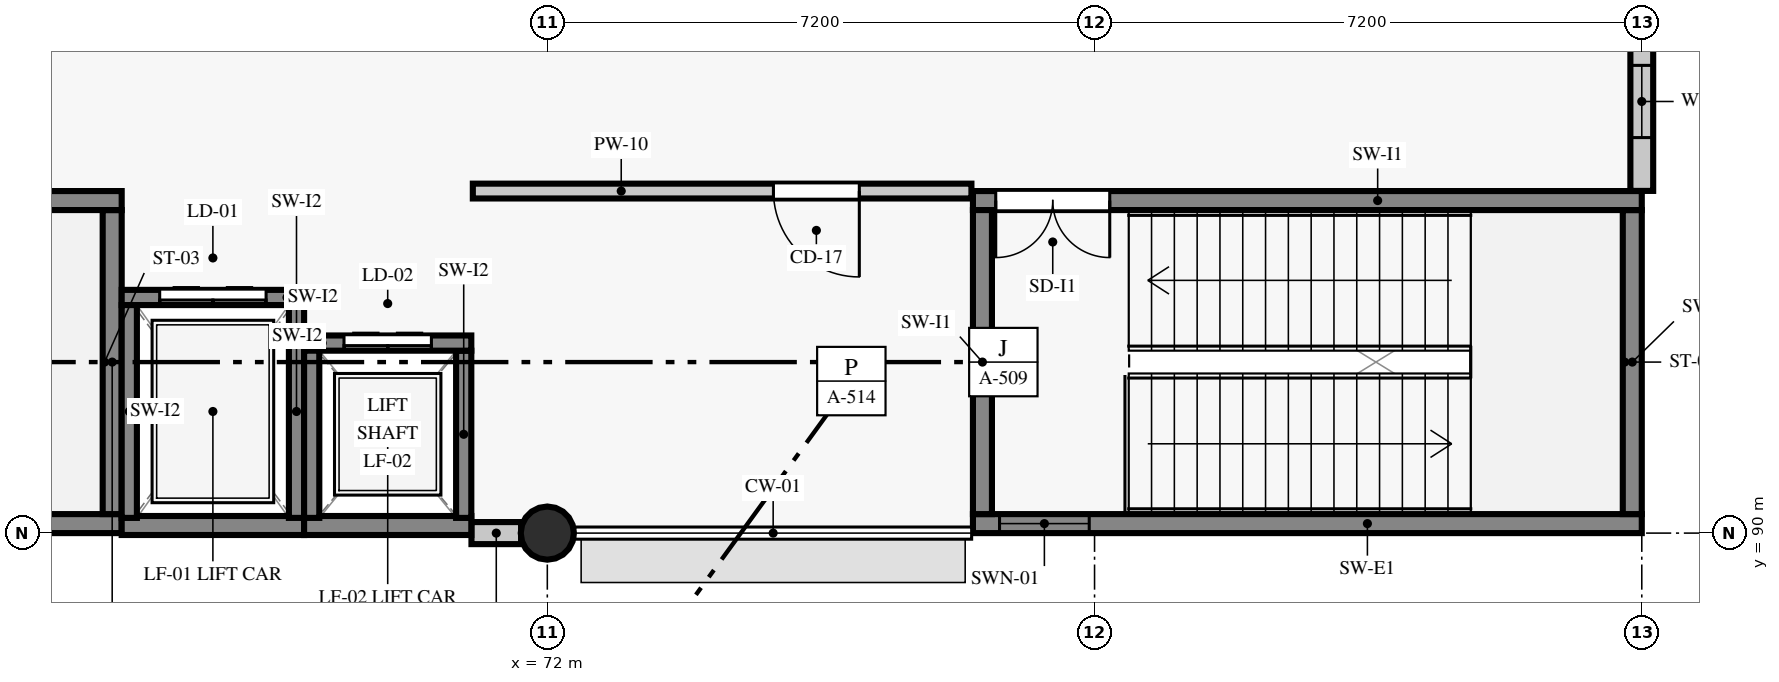
"""IFC4 building model, lengths in metres.
Left out: names, types, materials, properties, quantities, classifications, styles, units other than length and angle.
Written with IfcOpenShell. Run it as: python <this file> out.ifc"""

import sys

from ifc_helpers import new_model, si_unit, direction, frame, frame_2d, origin, origin_2d, place, context, subcontext, project, spatial, rectangle, circle, extrude, element, fill, save


model = new_model("IFC4")
c1 = context("Model", 3, precision=1e-05, world=origin(), true_north=direction((0.0, 1.0)))
c2 = subcontext(c1, "Body", "Model", "MODEL_VIEW")
j1 = project(units=[si_unit("LENGTHUNIT", "METRE"), si_unit("PLANEANGLEUNIT", "RADIAN")], contexts=[c1])
p1 = place(None, origin())
s1 = spatial("IfcSite", under=j1, at=p1, CompositionType="ELEMENT")
p2 = place(p1, origin())
s2 = spatial("IfcBuilding", under=s1, at=p2, CompositionType="ELEMENT")
p3 = place(p2, frame((0.0, 0.0, 4.8)))
s3 = spatial("IfcBuildingStorey", under=s2, at=p3, CompositionType="ELEMENT", Elevation=4.8)
p4 = place(p3, frame((72.0, 90.0, 0.0), z_axis=(0.0, 0.0, 1.0), x_axis=(1.0, 0.0, 0.0)))
e1 = element("IfcColumn", 1, at=p4, inside=s3, PredefinedType="COLUMN", context=c2, shape_type="SweptSolid", body=[
    extrude(circle(Radius=0.35, at=origin_2d()), origin(), (0.0, 0.0, 1.0), 4.555),
])
p5 = place(p3, frame((71.002, 90.0, 0.0), z_axis=(0.0, 0.0, 1.0), x_axis=(1.0, 0.0, 0.0)))
e2 = element("IfcWall", 2, at=p5, inside=s3, PredefinedType="STANDARD", context=c2, shape_type="SweptSolid", body=[
    extrude(rectangle(XDim=0.653, YDim=0.29, at=frame_2d((0.327, 0.0))), origin(), (0.0, 0.0, 1.0), 4.555),
])
p6 = place(p3, frame((86.4, 94.502, 0.0), z_axis=(0.0, 0.0, 1.0), x_axis=(0.0, 1.0, 0.0)))
e3 = element("IfcWall", 3, at=p6, inside=s3, PredefinedType="STANDARD", context=c2, shape_type="SweptSolid", body=[
    extrude(rectangle(XDim=2.353, YDim=0.3, at=frame_2d((1.177, 0.0))), origin(), (0.0, 0.0, 1.0), 4.555),
])
p7 = place(p6, frame((0.701, 0.0, 0.9)))
e4 = element("IfcOpeningElement", 4, at=p7, cuts=e3, PredefinedType="OPENING", context=c2, shape_type="SweptSolid", body=[
    extrude(rectangle(XDim=0.95, YDim=1.3, at=frame_2d((0.475, 0.65))), frame((0.0, 0.16, 0.0), z_axis=(0.0, -1.0, 0.0), x_axis=(1.0, 0.0, 0.0)), (0.0, 0.0, 1.0), 0.32),
])
p8 = place(p3, frame((57.6, 90.125, 0.0), z_axis=(0.0, 0.0, 1.0), x_axis=(1.0, 0.0, 0.0)))
e5 = element("IfcWall", 5, at=p8, inside=s3, PredefinedType="SHEAR", context=c2, shape_type="SweptSolid", body=[
    extrude(rectangle(XDim=8.8, YDim=0.25, at=frame_2d((4.4, 0.0))), origin(), (0.0, 0.0, 1.0), 4.555),
])
p9 = place(p8, frame((0.35, 0.0, 0.92)))
e6 = element("IfcOpeningElement", 6, at=p9, cuts=e5, PredefinedType="OPENING", context=c2, shape_type="SweptSolid", body=[
    extrude(rectangle(XDim=1.18, YDim=1.48, at=frame_2d((0.59, 0.74))), frame((0.0, 0.135, 0.0), z_axis=(0.0, -1.0, 0.0), x_axis=(1.0, 0.0, 0.0)), (0.0, 0.0, 1.0), 0.27),
])
p10 = place(p3, frame((66.275, 90.25, 0.0), z_axis=(0.0, 0.0, 1.0), x_axis=(0.0, 1.0, 0.0)))
e7 = element("IfcWall", 7, at=p10, inside=s3, PredefinedType="SHEAR", context=c2, shape_type="SweptSolid", body=[
    extrude(rectangle(XDim=4.0, YDim=0.25, at=frame_2d((2.0, 0.0))), origin(), (0.0, 0.0, 1.0), 4.555),
])
p11 = place(p3, frame((66.4, 94.375, 0.0), z_axis=(0.0, 0.0, 1.0), x_axis=(-1.0, 0.0, 0.0)))
e8 = element("IfcWall", 8, at=p11, inside=s3, PredefinedType="SHEAR", context=c2, shape_type="SweptSolid", body=[
    extrude(rectangle(XDim=8.8, YDim=0.25, at=frame_2d((4.4, 0.0))), origin(), (0.0, 0.0, 1.0), 4.555),
])
p12 = place(p11, frame((7.0, 0.0, 0.0)))
e9 = element("IfcOpeningElement", 9, at=p12, cuts=e8, PredefinedType="OPENING", context=c2, shape_type="SweptSolid", body=[
    extrude(rectangle(XDim=1.5, YDim=2.15, at=frame_2d((0.75, 1.075))), frame((0.0, 0.135, 0.0), z_axis=(0.0, -1.0, 0.0), x_axis=(1.0, 0.0, 0.0)), (0.0, 0.0, 1.0), 0.27),
])
p13 = place(p3, frame((77.6, 90.125, 0.0), z_axis=(0.0, 0.0, 1.0), x_axis=(1.0, 0.0, 0.0)))
e10 = element("IfcWall", 10, at=p13, inside=s3, PredefinedType="SHEAR", context=c2, shape_type="SweptSolid", body=[
    extrude(rectangle(XDim=8.8, YDim=0.25, at=frame_2d((4.4, 0.0))), origin(), (0.0, 0.0, 1.0), 4.555),
])
p14 = place(p13, frame((0.35, 0.0, 0.92)))
e11 = element("IfcOpeningElement", 11, at=p14, cuts=e10, PredefinedType="OPENING", context=c2, shape_type="SweptSolid", body=[
    extrude(rectangle(XDim=1.18, YDim=1.48, at=frame_2d((0.59, 0.74))), frame((0.0, 0.135, 0.0), z_axis=(0.0, -1.0, 0.0), x_axis=(1.0, 0.0, 0.0)), (0.0, 0.0, 1.0), 0.27),
])
p15 = place(p3, frame((86.275, 90.25, 0.0), z_axis=(0.0, 0.0, 1.0), x_axis=(0.0, 1.0, 0.0)))
e12 = element("IfcWall", 12, at=p15, inside=s3, PredefinedType="SHEAR", context=c2, shape_type="SweptSolid", body=[
    extrude(rectangle(XDim=4.0, YDim=0.25, at=frame_2d((2.0, 0.0))), origin(), (0.0, 0.0, 1.0), 4.555),
])
p16 = place(p3, frame((86.4, 94.375, 0.0), z_axis=(0.0, 0.0, 1.0), x_axis=(-1.0, 0.0, 0.0)))
e13 = element("IfcWall", 13, at=p16, inside=s3, PredefinedType="SHEAR", context=c2, shape_type="SweptSolid", body=[
    extrude(rectangle(XDim=8.8, YDim=0.25, at=frame_2d((4.4, 0.0))), origin(), (0.0, 0.0, 1.0), 4.555),
])
p17 = place(p16, frame((7.0, 0.0, 0.0)))
e14 = element("IfcOpeningElement", 14, at=p17, cuts=e13, PredefinedType="OPENING", context=c2, shape_type="SweptSolid", body=[
    extrude(rectangle(XDim=1.5, YDim=2.15, at=frame_2d((0.75, 1.075))), frame((0.0, 0.135, 0.0), z_axis=(0.0, -1.0, 0.0), x_axis=(1.0, 0.0, 0.0)), (0.0, 0.0, 1.0), 0.27),
])
p18 = place(p3, frame((77.725, 94.25, 0.0), z_axis=(0.0, 0.0, 1.0), x_axis=(0.0, -1.0, 0.0)))
e15 = element("IfcWall", 15, at=p18, inside=s3, PredefinedType="SHEAR", context=c2, shape_type="SweptSolid", body=[
    extrude(rectangle(XDim=4.0, YDim=0.25, at=frame_2d((2.0, 0.0))), origin(), (0.0, 0.0, 1.0), 4.555),
])
p19 = place(p3, frame((66.4, 90.1, 0.0), z_axis=(0.0, 0.0, 1.0), x_axis=(1.0, 0.0, 0.0)))
e16 = element("IfcWall", 16, at=p19, inside=s3, PredefinedType="SHEAR", context=c2, shape_type="SweptSolid", body=[
    extrude(rectangle(XDim=2.4, YDim=0.25, at=frame_2d((1.2, 0.0))), origin(), (0.0, 0.0, 1.0), 4.555),
])
p20 = place(p3, frame((68.7, 90.2, 0.0), z_axis=(0.0, 0.0, 1.0), x_axis=(0.0, 1.0, 0.0)))
e17 = element("IfcWall", 17, at=p20, inside=s3, PredefinedType="SHEAR", context=c2, shape_type="SweptSolid", body=[
    extrude(rectangle(XDim=2.8, YDim=0.2, at=frame_2d((1.4, 0.0))), origin(), (0.0, 0.0, 1.0), 4.555),
])
p21 = place(p3, frame((68.8, 93.1, 0.0), z_axis=(0.0, 0.0, 1.0), x_axis=(-1.0, 0.0, 0.0)))
e18 = element("IfcWall", 18, at=p21, inside=s3, PredefinedType="SHEAR", context=c2, shape_type="SweptSolid", body=[
    extrude(rectangle(XDim=2.4, YDim=0.2, at=frame_2d((1.2, 0.0))), origin(), (0.0, 0.0, 1.0), 4.555),
])
p22 = place(p21, frame((0.5, 0.0, 0.0)))
e19 = element("IfcOpeningElement", 19, at=p22, cuts=e18, PredefinedType="OPENING", context=c2, shape_type="SweptSolid", body=[
    extrude(rectangle(XDim=1.4, YDim=2.15, at=frame_2d((0.7, 1.075))), frame((0.0, 0.11, 0.0), z_axis=(0.0, -1.0, 0.0), x_axis=(1.0, 0.0, 0.0)), (0.0, 0.0, 1.0), 0.22),
])
p23 = place(p3, frame((66.5, 93.0, 0.0), z_axis=(0.0, 0.0, 1.0), x_axis=(0.0, -1.0, 0.0)))
e20 = element("IfcWall", 20, at=p23, inside=s3, PredefinedType="SHEAR", context=c2, shape_type="SweptSolid", body=[
    extrude(rectangle(XDim=2.8, YDim=0.2, at=frame_2d((1.4, 0.0))), origin(), (0.0, 0.0, 1.0), 4.555),
])
p24 = place(p3, frame((68.8, 90.1, 0.0), z_axis=(0.0, 0.0, 1.0), x_axis=(1.0, 0.0, 0.0)))
e21 = element("IfcWall", 21, at=p24, inside=s3, PredefinedType="SHEAR", context=c2, shape_type="SweptSolid", body=[
    extrude(rectangle(XDim=2.2, YDim=0.25, at=frame_2d((1.1, 0.0))), origin(), (0.0, 0.0, 1.0), 4.555),
])
p25 = place(p3, frame((70.9, 90.2, 0.0), z_axis=(0.0, 0.0, 1.0), x_axis=(0.0, 1.0, 0.0)))
e22 = element("IfcWall", 22, at=p25, inside=s3, PredefinedType="SHEAR", context=c2, shape_type="SweptSolid", body=[
    extrude(rectangle(XDim=2.2, YDim=0.2, at=frame_2d((1.1, 0.0))), origin(), (0.0, 0.0, 1.0), 4.555),
])
p26 = place(p3, frame((71.0, 92.5, 0.0), z_axis=(0.0, 0.0, 1.0), x_axis=(-1.0, 0.0, 0.0)))
e23 = element("IfcWall", 23, at=p26, inside=s3, PredefinedType="SHEAR", context=c2, shape_type="SweptSolid", body=[
    extrude(rectangle(XDim=2.2, YDim=0.2, at=frame_2d((1.1, 0.0))), origin(), (0.0, 0.0, 1.0), 4.555),
])
p27 = place(p26, frame((0.525, 0.0, 0.0)))
e24 = element("IfcOpeningElement", 24, at=p27, cuts=e23, PredefinedType="OPENING", context=c2, shape_type="SweptSolid", body=[
    extrude(rectangle(XDim=1.15, YDim=2.15, at=frame_2d((0.575, 1.075))), frame((0.0, 0.11, 0.0), z_axis=(0.0, -1.0, 0.0), x_axis=(1.0, 0.0, 0.0)), (0.0, 0.0, 1.0), 0.22),
])
p28 = place(p3, frame((68.9, 92.4, 0.0), z_axis=(0.0, 0.0, 1.0), x_axis=(0.0, -1.0, 0.0)))
e25 = element("IfcWall", 25, at=p28, inside=s3, PredefinedType="SHEAR", context=c2, shape_type="SweptSolid", body=[
    extrude(rectangle(XDim=2.2, YDim=0.2, at=frame_2d((1.1, 0.0))), origin(), (0.0, 0.0, 1.0), 4.555),
])
p29 = place(p3, frame((71.02, 94.5, 0.0), z_axis=(0.0, 0.0, 1.0), x_axis=(1.0, 0.0, 0.0)))
e26 = element("IfcWall", 26, at=p29, inside=s3, PredefinedType="PARTITIONING", context=c2, shape_type="SweptSolid", body=[
    extrude(rectangle(XDim=6.56, YDim=0.195, at=frame_2d((3.28, 0.0))), origin(), (0.0, 0.0, 1.0), 4.005),
])
p30 = place(p29, frame((3.955, 0.0, 0.0)))
e27 = element("IfcOpeningElement", 27, at=p30, cuts=e26, PredefinedType="OPENING", context=c2, shape_type="SweptSolid", body=[
    extrude(rectangle(XDim=1.13, YDim=2.18, at=frame_2d((0.565, 1.09))), frame((0.0, 0.107, 0.0), z_axis=(0.0, -1.0, 0.0), x_axis=(1.0, 0.0, 0.0)), (0.0, 0.0, 1.0), 0.215),
])
p31 = place(p7, origin())
e28 = element("IfcWindow", 28, at=p31, inside=s3, PartitioningType="SINGLE_PANEL", PredefinedType="WINDOW", context=c2, shape_type="SweptSolid", body=[
    extrude(rectangle(XDim=0.95, YDim=1.3, at=frame_2d((0.475, 0.65))), frame((0.0, 0.03, 0.0), z_axis=(0.0, -1.0, 0.0), x_axis=(1.0, 0.0, 0.0)), (0.0, 0.0, 1.0), 0.06),
])
fill(e4, e28)
p32 = place(p14, origin())
e29 = element("IfcWindow", 29, at=p32, inside=s3, PartitioningType="SINGLE_PANEL", PredefinedType="WINDOW", context=c2, shape_type="SweptSolid", body=[
    extrude(rectangle(XDim=1.18, YDim=1.48, at=frame_2d((0.59, 0.74))), frame((0.0, 0.03, 0.0), z_axis=(0.0, -1.0, 0.0), x_axis=(1.0, 0.0, 0.0)), (0.0, 0.0, 1.0), 0.06),
])
fill(e11, e29)
p33 = place(p17, origin())
e30 = element("IfcDoor", 30, at=p33, inside=s3, OperationType="DOUBLE_DOOR_SINGLE_SWING", PredefinedType="DOOR", context=c2, shape_type="SweptSolid", body=[
    extrude(rectangle(XDim=1.5, YDim=2.15, at=frame_2d((0.75, 1.075))), frame((0.0, 0.025, 0.0), z_axis=(0.0, -1.0, 0.0), x_axis=(1.0, 0.0, 0.0)), (0.0, 0.0, 1.0), 0.05),
])
fill(e14, e30)
p34 = place(p22, frame((1.4, 0.0, 0.0), z_axis=(0.0, 0.0, 1.0), x_axis=(-1.0, 0.0, 0.0)))
e31 = element("IfcDoor", 31, at=p34, inside=s3, OperationType="DOUBLE_DOOR_SLIDING", PredefinedType="DOOR", context=c2, shape_type="SweptSolid", body=[
    extrude(rectangle(XDim=1.4, YDim=2.15, at=frame_2d((0.7, 1.075))), frame((0.0, 0.025, 0.0), z_axis=(0.0, -1.0, 0.0), x_axis=(1.0, 0.0, 0.0)), (0.0, 0.0, 1.0), 0.05),
])
fill(e19, e31)
p35 = place(p27, frame((1.15, 0.0, 0.0), z_axis=(0.0, 0.0, 1.0), x_axis=(-1.0, 0.0, 0.0)))
e32 = element("IfcDoor", 32, at=p35, inside=s3, OperationType="DOUBLE_DOOR_SLIDING", PredefinedType="DOOR", context=c2, shape_type="SweptSolid", body=[
    extrude(rectangle(XDim=1.15, YDim=2.15, at=frame_2d((0.575, 1.075))), frame((0.0, 0.025, 0.0), z_axis=(0.0, -1.0, 0.0), x_axis=(1.0, 0.0, 0.0)), (0.0, 0.0, 1.0), 0.05),
])
fill(e24, e32)
p36 = place(p30, frame((1.13, 0.0, 0.0), z_axis=(0.0, 0.0, 1.0), x_axis=(-1.0, 0.0, 0.0)))
e33 = element("IfcDoor", 33, at=p36, inside=s3, OperationType="SINGLE_SWING_LEFT", PredefinedType="DOOR", context=c2, shape_type="SweptSolid", body=[
    extrude(rectangle(XDim=1.13, YDim=2.18, at=frame_2d((0.565, 1.09))), frame((0.0, 0.025, 0.0), z_axis=(0.0, -1.0, 0.0), x_axis=(1.0, 0.0, 0.0)), (0.0, 0.0, 1.0), 0.05),
])
fill(e27, e33)
save(model, sys.argv[1])
